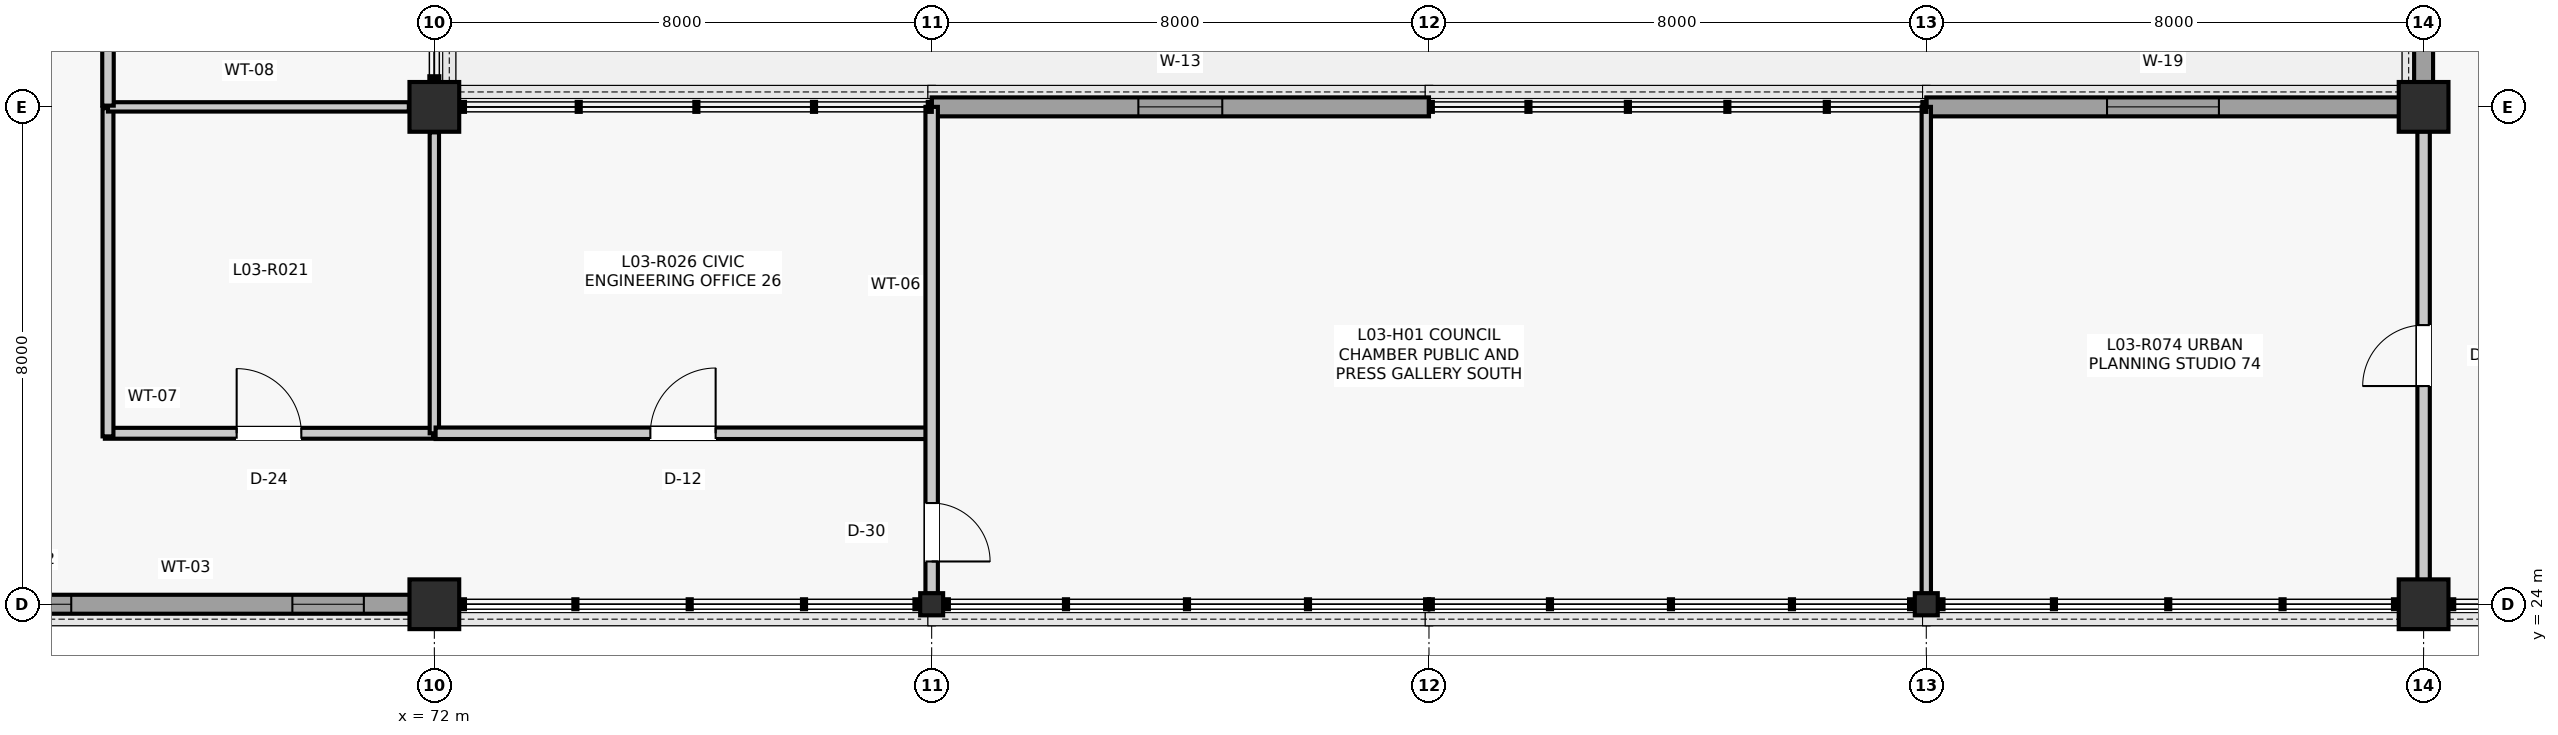
"""IFC4 building model, lengths in metres.
Left out: names, types, materials, properties, quantities, classifications, styles, units other than length and angle.
Written with IfcOpenShell. Run it as: python <this file> out.ifc"""

import sys

from ifc_helpers import new_model, si_unit, direction, frame, frame_2d, origin, origin_2d, place, context, subcontext, project, spatial, rectangle, i_section, extrude, element, fill, save


model = new_model("IFC4")
c1 = context("Model", 3, precision=1e-05, world=origin(), true_north=direction((0.0, 1.0)))
c2 = subcontext(c1, "Body", "Model", "MODEL_VIEW")
j1 = project(units=[si_unit("LENGTHUNIT", "METRE"), si_unit("PLANEANGLEUNIT", "RADIAN")], contexts=[c1])
p1 = place(None, origin())
s1 = spatial("IfcSite", under=j1, at=p1, CompositionType="ELEMENT")
p2 = place(p1, origin())
s2 = spatial("IfcBuilding", under=s1, at=p2, CompositionType="ELEMENT")
p3 = place(p2, frame((0.0, 0.0, 13.86)))
s3 = spatial("IfcBuildingStorey", under=s2, at=p3, CompositionType="ELEMENT", Elevation=13.86)
for number, where, z_axis, x_axis in (
    (1, (72.0, 24.0, 0.0), (0.0, 0.0, 1.0), (1.0, 0.0, 0.0)),
    (2, (72.0, 32.0, 0.0), (0.0, 0.0, 1.0), (1.0, 0.0, 0.0)),
):
    element("IfcColumn", number, at=place(p3, frame(where, z_axis=z_axis, x_axis=x_axis)), inside=s3, PredefinedType="COLUMN", context=c2, shape_type="SweptSolid", body=[
        extrude(rectangle(XDim=0.8, YDim=0.8, at=origin_2d()), origin(), (0.0, 0.0, 1.0), 3.96),
    ])
for number, where, z_axis, x_axis in (
    (3, (80.0, 24.0, 0.0), (0.0, 0.0, 1.0), (1.0, 0.0, 0.0)),
    (4, (96.0, 24.0, 0.0), (0.0, 0.0, 1.0), (1.0, 0.0, 0.0)),
):
    element("IfcColumn", number, at=place(p3, frame(where, z_axis=z_axis, x_axis=x_axis)), inside=s3, PredefinedType="COLUMN", context=c2, shape_type="SweptSolid", body=[
        extrude(i_section(OverallWidth=0.369, OverallDepth=0.356, WebThickness=0.011, FlangeThickness=0.018, FilletRadius=0.015, at=origin_2d()), origin(), (0.0, 0.0, 1.0), 3.96),
    ])
for number, where, z_axis, x_axis in (
    (5, (104.0, 24.0, 0.0), (0.0, 0.0, 1.0), (1.0, 0.0, 0.0)),
    (6, (104.0, 32.0, 0.0), (0.0, 0.0, 1.0), (1.0, 0.0, 0.0)),
):
    element("IfcColumn", number, at=place(p3, frame(where, z_axis=z_axis, x_axis=x_axis)), inside=s3, PredefinedType="COLUMN", context=c2, shape_type="SweptSolid", body=[
        extrude(rectangle(XDim=0.8, YDim=0.8, at=origin_2d()), origin(), (0.0, 0.0, 1.0), 3.96),
    ])
p4 = place(p3, frame((64.26, 24.0, 0.0), z_axis=(0.0, 0.0, 1.0), x_axis=(1.0, 0.0, 0.0)))
e7 = element("IfcWall", 7, at=p4, inside=s3, PredefinedType="SOLIDWALL", context=c2, shape_type="SweptSolid", body=[
    extrude(rectangle(XDim=7.355, YDim=0.305, at=frame_2d((3.677, 0.0))), origin(), (0.0, 0.0, 1.0), 3.304),
])
p5 = place(p4, frame((0.749, 0.0, 0.95)))
e8 = element("IfcOpeningElement", 8, at=p5, cuts=e7, PredefinedType="OPENING", context=c2, shape_type="SweptSolid", body=[
    extrude(rectangle(XDim=1.15, YDim=1.65, at=frame_2d((0.575, 0.825))), frame((0.0, 0.162, 0.0), z_axis=(0.0, -1.0, 0.0), x_axis=(1.0, 0.0, 0.0)), (0.0, 0.0, 1.0), 0.325),
])
p6 = place(p4, frame((5.456, 0.0, 0.95)))
e9 = element("IfcOpeningElement", 9, at=p6, cuts=e7, PredefinedType="OPENING", context=c2, shape_type="SweptSolid", body=[
    extrude(rectangle(XDim=1.15, YDim=1.65, at=frame_2d((0.575, 0.825))), frame((0.0, 0.162, 0.0), z_axis=(0.0, -1.0, 0.0), x_axis=(1.0, 0.0, 0.0)), (0.0, 0.0, 1.0), 0.325),
])
p7 = place(p3, frame((80.0, 32.0, 0.0), z_axis=(0.0, 0.0, 1.0), x_axis=(1.0, 0.0, 0.0)))
e10 = element("IfcWall", 10, at=p7, inside=s3, PredefinedType="SOLIDWALL", context=c2, shape_type="SweptSolid", body=[
    extrude(rectangle(XDim=8.0, YDim=0.305, at=frame_2d((4.0, 0.0))), origin(), (0.0, 0.0, 1.0), 3.725),
])
p8 = place(p7, frame((3.325, 0.0, 0.9)))
e11 = element("IfcOpeningElement", 11, at=p8, cuts=e10, PredefinedType="OPENING", context=c2, shape_type="SweptSolid", body=[
    extrude(rectangle(XDim=1.35, YDim=1.9, at=frame_2d((0.675, 0.95))), frame((0.0, 0.162, 0.0), z_axis=(0.0, -1.0, 0.0), x_axis=(1.0, 0.0, 0.0)), (0.0, 0.0, 1.0), 0.325),
])
p9 = place(p3, frame((96.0, 32.0, 0.0), z_axis=(0.0, 0.0, 1.0), x_axis=(1.0, 0.0, 0.0)))
e12 = element("IfcWall", 12, at=p9, inside=s3, PredefinedType="SOLIDWALL", context=c2, shape_type="SweptSolid", body=[
    extrude(rectangle(XDim=7.615, YDim=0.305, at=frame_2d((3.808, 0.0))), origin(), (0.0, 0.0, 1.0), 3.725),
])
p10 = place(p9, frame((2.907, 0.0, 1.35)))
e13 = element("IfcOpeningElement", 13, at=p10, cuts=e12, PredefinedType="OPENING", context=c2, shape_type="SweptSolid", body=[
    extrude(rectangle(XDim=1.8, YDim=1.2, at=frame_2d((0.9, 0.6))), frame((0.0, 0.162, 0.0), z_axis=(0.0, -1.0, 0.0), x_axis=(1.0, 0.0, 0.0)), (0.0, 0.0, 1.0), 0.325),
])
p11 = place(p3, frame((104.0, 32.385, 0.0), z_axis=(0.0, 0.0, 1.0), x_axis=(0.0, 1.0, 0.0)))
e14 = element("IfcWall", 14, at=p11, inside=s3, PredefinedType="SOLIDWALL", context=c2, shape_type="SweptSolid", body=[
    extrude(rectangle(XDim=7.23, YDim=0.305, at=frame_2d((3.615, 0.0))), origin(), (0.0, 0.0, 1.0), 3.3),
])
p12 = place(p11, frame((2.865, 0.0, 0.9)))
e15 = element("IfcOpeningElement", 15, at=p12, cuts=e14, PredefinedType="OPENING", context=c2, shape_type="SweptSolid", body=[
    extrude(rectangle(XDim=1.5, YDim=1.9, at=frame_2d((0.75, 0.95))), frame((0.0, 0.162, 0.0), z_axis=(0.0, -1.0, 0.0), x_axis=(1.0, 0.0, 0.0)), (0.0, 0.0, 1.0), 0.325),
])
p13 = place(p3, frame((66.7, 26.75, 0.0), z_axis=(0.0, 0.0, 1.0), x_axis=(1.0, 0.0, 0.0)))
e16 = element("IfcWall", 16, at=p13, inside=s3, PredefinedType="PARTITIONING", context=c2, shape_type="SweptSolid", body=[
    extrude(rectangle(XDim=5.28, YDim=0.175, at=frame_2d((2.64, 0.0))), origin(), (0.0, 0.0, 1.0), 3.242),
])
p14 = place(p13, frame((2.12, 0.0, 0.0)))
e17 = element("IfcOpeningElement", 17, at=p14, cuts=e16, PredefinedType="OPENING", context=c2, shape_type="SweptSolid", body=[
    extrude(rectangle(XDim=1.04, YDim=2.18, at=frame_2d((0.52, 1.09))), frame((0.0, 0.097, 0.0), z_axis=(0.0, -1.0, 0.0), x_axis=(1.0, 0.0, 0.0)), (0.0, 0.0, 1.0), 0.195),
])
p15 = place(p3, frame((66.75, 26.7, 0.0), z_axis=(0.0, 0.0, 1.0), x_axis=(0.0, 1.0, 0.0)))
e18 = element("IfcWall", 18, at=p15, inside=s3, PredefinedType="PARTITIONING", context=c2, shape_type="SweptSolid", body=[
    extrude(rectangle(XDim=5.28, YDim=0.175, at=frame_2d((2.64, 0.0))), origin(), (0.0, 0.0, 1.0), 3.247),
])
p16 = place(p3, frame((66.75, 32.0, 0.0), z_axis=(0.0, 0.0, 1.0), x_axis=(1.0, 0.0, 0.0)))
e19 = element("IfcWall", 19, at=p16, inside=s3, PredefinedType="PARTITIONING", context=c2, shape_type="SweptSolid", body=[
    extrude(rectangle(XDim=4.84, YDim=0.15, at=frame_2d((2.42, 0.0))), origin(), (0.0, 0.0, 1.0), 3.247),
])
p17 = place(p3, frame((72.0, 26.75, 0.0), z_axis=(0.0, 0.0, 1.0), x_axis=(0.0, 1.0, 0.0)))
e20 = element("IfcWall", 20, at=p17, inside=s3, PredefinedType="PARTITIONING", context=c2, shape_type="SweptSolid", body=[
    extrude(rectangle(XDim=4.84, YDim=0.15, at=frame_2d((2.42, 0.0))), origin(), (0.0, 0.0, 1.0), 3.242),
])
p18 = place(p3, frame((66.75, 32.02, 0.0), z_axis=(0.0, 0.0, 1.0), x_axis=(0.0, 1.0, 0.0)))
e21 = element("IfcWall", 21, at=p18, inside=s3, PredefinedType="PARTITIONING", context=c2, shape_type="SweptSolid", body=[
    extrude(rectangle(XDim=7.96, YDim=0.185, at=frame_2d((3.98, 0.0))), origin(), (0.0, 0.0, 1.0), 3.247),
])
p19 = place(p18, frame((3.5, 0.0, 0.0)))
e22 = element("IfcOpeningElement", 22, at=p19, cuts=e21, PredefinedType="OPENING", context=c2, shape_type="SweptSolid", body=[
    extrude(rectangle(XDim=0.96, YDim=2.14, at=frame_2d((0.48, 1.07))), frame((0.0, 0.103, 0.0), z_axis=(0.0, -1.0, 0.0), x_axis=(1.0, 0.0, 0.0)), (0.0, 0.0, 1.0), 0.205),
])
p20 = place(p3, frame((72.02, 26.75, 0.0), z_axis=(0.0, 0.0, 1.0), x_axis=(1.0, 0.0, 0.0)))
e23 = element("IfcWall", 23, at=p20, inside=s3, PredefinedType="PARTITIONING", context=c2, shape_type="SweptSolid", body=[
    extrude(rectangle(XDim=7.96, YDim=0.185, at=frame_2d((3.98, 0.0))), origin(), (0.0, 0.0, 1.0), 3.242),
])
p21 = place(p20, frame((3.455, 0.0, 0.0)))
e24 = element("IfcOpeningElement", 24, at=p21, cuts=e23, PredefinedType="OPENING", context=c2, shape_type="SweptSolid", body=[
    extrude(rectangle(XDim=1.05, YDim=2.15, at=frame_2d((0.525, 1.075))), frame((0.0, 0.103, 0.0), z_axis=(0.0, -1.0, 0.0), x_axis=(1.0, 0.0, 0.0)), (0.0, 0.0, 1.0), 0.205),
])
p22 = place(p3, frame((80.0, 24.168, 0.0), z_axis=(0.0, 0.0, 1.0), x_axis=(0.0, 1.0, 0.0)))
e25 = element("IfcWall", 25, at=p22, inside=s3, PredefinedType="PARTITIONING", context=c2, shape_type="SweptSolid", body=[
    extrude(rectangle(XDim=7.832, YDim=0.2, at=frame_2d((3.916, 0.0))), origin(), (0.0, 0.0, 1.0), 3.715),
])
p23 = place(p22, frame((0.52, 0.0, 0.0)))
e26 = element("IfcOpeningElement", 26, at=p23, cuts=e25, PredefinedType="OPENING", context=c2, shape_type="SweptSolid", body=[
    extrude(rectangle(XDim=0.94, YDim=2.12, at=frame_2d((0.47, 1.06))), frame((0.0, 0.11, 0.0), z_axis=(0.0, -1.0, 0.0), x_axis=(1.0, 0.0, 0.0)), (0.0, 0.0, 1.0), 0.22),
])
p24 = place(p3, frame((96.0, 24.168, 0.0), z_axis=(0.0, 0.0, 1.0), x_axis=(0.0, 1.0, 0.0)))
e27 = element("IfcWall", 27, at=p24, inside=s3, PredefinedType="PARTITIONING", context=c2, shape_type="SweptSolid", body=[
    extrude(rectangle(XDim=7.832, YDim=0.15, at=frame_2d((3.916, 0.0))), origin(), (0.0, 0.0, 1.0), 3.715),
])
p25 = place(p3, frame((104.0, 24.39, 0.0), z_axis=(0.0, 0.0, 1.0), x_axis=(0.0, 1.0, 0.0)))
e28 = element("IfcWall", 28, at=p25, inside=s3, PredefinedType="PARTITIONING", context=c2, shape_type="SweptSolid", body=[
    extrude(rectangle(XDim=7.22, YDim=0.2, at=frame_2d((3.61, 0.0))), origin(), (0.0, 0.0, 1.0), 3.248),
])
p26 = place(p25, frame((3.12, 0.0, 0.0)))
e29 = element("IfcOpeningElement", 29, at=p26, cuts=e28, PredefinedType="OPENING", context=c2, shape_type="SweptSolid", body=[
    extrude(rectangle(XDim=0.98, YDim=2.15, at=frame_2d((0.49, 1.075))), frame((0.0, 0.11, 0.0), z_axis=(0.0, -1.0, 0.0), x_axis=(1.0, 0.0, 0.0)), (0.0, 0.0, 1.0), 0.22),
])
p27 = place(p5, origin())
e30 = element("IfcWindow", 30, at=p27, inside=s3, PartitioningType="SINGLE_PANEL", PredefinedType="WINDOW", context=c2, shape_type="SweptSolid", body=[
    extrude(rectangle(XDim=1.15, YDim=1.65, at=frame_2d((0.575, 0.825))), frame((0.0, 0.03, 0.0), z_axis=(0.0, -1.0, 0.0), x_axis=(1.0, 0.0, 0.0)), (0.0, 0.0, 1.0), 0.06),
])
fill(e8, e30)
p28 = place(p6, origin())
e31 = element("IfcWindow", 31, at=p28, inside=s3, PartitioningType="SINGLE_PANEL", PredefinedType="WINDOW", context=c2, shape_type="SweptSolid", body=[
    extrude(rectangle(XDim=1.15, YDim=1.65, at=frame_2d((0.575, 0.825))), frame((0.0, 0.03, 0.0), z_axis=(0.0, -1.0, 0.0), x_axis=(1.0, 0.0, 0.0)), (0.0, 0.0, 1.0), 0.06),
])
fill(e9, e31)
p29 = place(p8, origin())
e32 = element("IfcWindow", 32, at=p29, inside=s3, PartitioningType="SINGLE_PANEL", PredefinedType="WINDOW", context=c2, shape_type="SweptSolid", body=[
    extrude(rectangle(XDim=1.35, YDim=1.9, at=frame_2d((0.675, 0.95))), frame((0.0, 0.03, 0.0), z_axis=(0.0, -1.0, 0.0), x_axis=(1.0, 0.0, 0.0)), (0.0, 0.0, 1.0), 0.06),
])
fill(e11, e32)
p30 = place(p10, origin())
e33 = element("IfcWindow", 33, at=p30, inside=s3, PartitioningType="SINGLE_PANEL", PredefinedType="WINDOW", context=c2, shape_type="SweptSolid", body=[
    extrude(rectangle(XDim=1.8, YDim=1.2, at=frame_2d((0.9, 0.6))), frame((0.0, 0.03, 0.0), z_axis=(0.0, -1.0, 0.0), x_axis=(1.0, 0.0, 0.0)), (0.0, 0.0, 1.0), 0.06),
])
fill(e13, e33)
p31 = place(p14, origin())
e34 = element("IfcDoor", 34, at=p31, inside=s3, OperationType="SINGLE_SWING_LEFT", PredefinedType="DOOR", context=c2, shape_type="SweptSolid", body=[
    extrude(rectangle(XDim=1.04, YDim=2.18, at=frame_2d((0.52, 1.09))), frame((0.0, 0.025, 0.0), z_axis=(0.0, -1.0, 0.0), x_axis=(1.0, 0.0, 0.0)), (0.0, 0.0, 1.0), 0.05),
])
fill(e17, e34)
p32 = place(p21, origin())
e35 = element("IfcDoor", 35, at=p32, inside=s3, OperationType="SINGLE_SWING_RIGHT", PredefinedType="DOOR", context=c2, shape_type="SweptSolid", body=[
    extrude(rectangle(XDim=1.05, YDim=2.15, at=frame_2d((0.525, 1.075))), frame((0.0, 0.025, 0.0), z_axis=(0.0, -1.0, 0.0), x_axis=(1.0, 0.0, 0.0)), (0.0, 0.0, 1.0), 0.05),
])
fill(e24, e35)
p33 = place(p23, frame((0.94, 0.0, 0.0), z_axis=(0.0, 0.0, 1.0), x_axis=(-1.0, 0.0, 0.0)))
e36 = element("IfcDoor", 36, at=p33, inside=s3, OperationType="SINGLE_SWING_LEFT", PredefinedType="DOOR", context=c2, shape_type="SweptSolid", body=[
    extrude(rectangle(XDim=0.94, YDim=2.12, at=frame_2d((0.47, 1.06))), frame((0.0, 0.025, 0.0), z_axis=(0.0, -1.0, 0.0), x_axis=(1.0, 0.0, 0.0)), (0.0, 0.0, 1.0), 0.05),
])
fill(e26, e36)
p34 = place(p26, origin())
e37 = element("IfcDoor", 37, at=p34, inside=s3, OperationType="SINGLE_SWING_LEFT", PredefinedType="DOOR", context=c2, shape_type="SweptSolid", body=[
    extrude(rectangle(XDim=0.98, YDim=2.15, at=frame_2d((0.49, 1.075))), frame((0.0, 0.025, 0.0), z_axis=(0.0, -1.0, 0.0), x_axis=(1.0, 0.0, 0.0)), (0.0, 0.0, 1.0), 0.05),
])
fill(e29, e37)
save(model, sys.argv[1])
